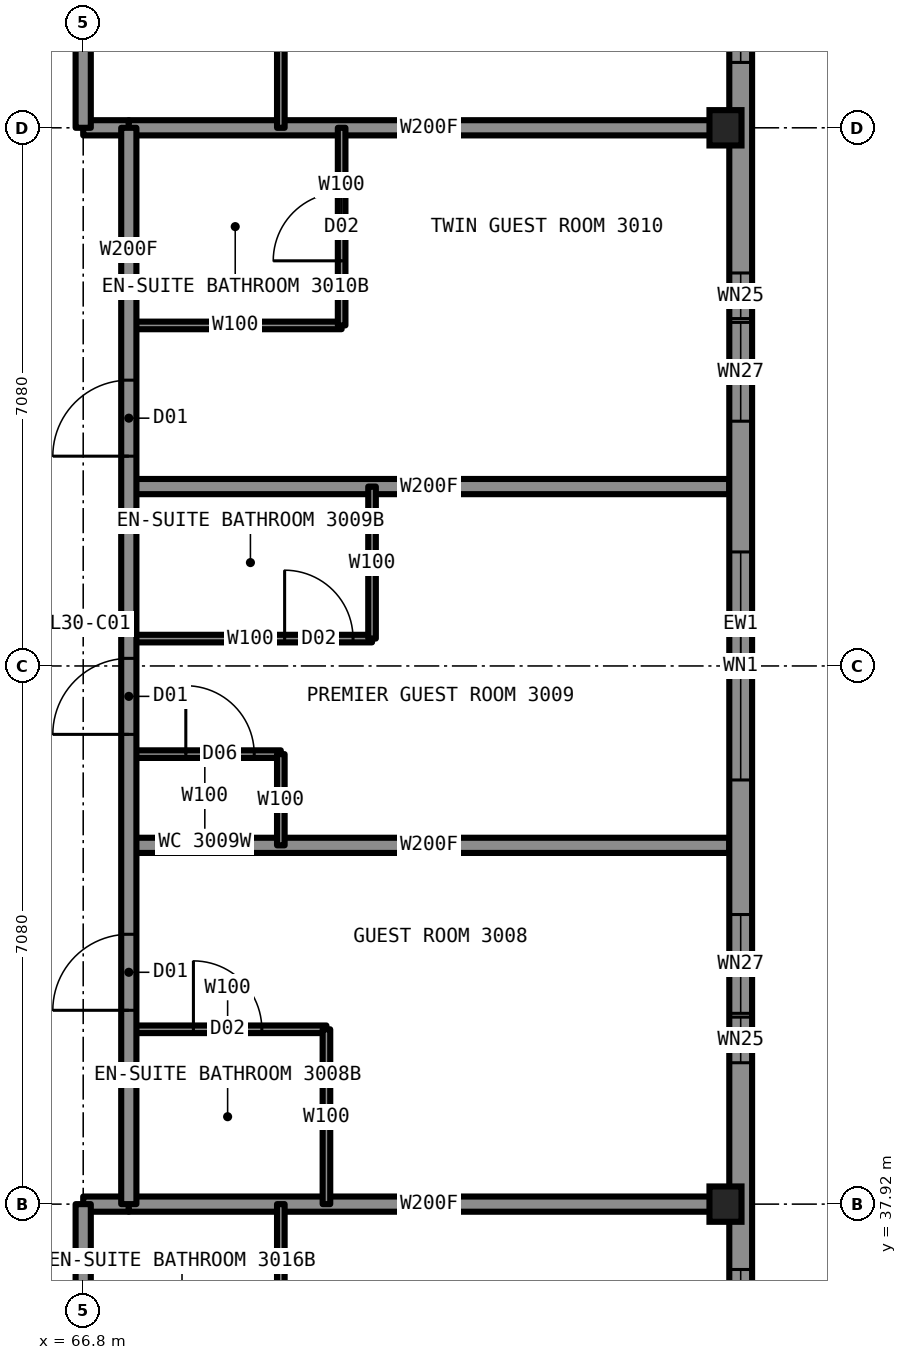
"""IFC4 building model, lengths in metres.
Left out: names, types, materials, properties, quantities, classifications, styles, units other than length and angle.
Written with IfcOpenShell. Run it as: python <this file> out.ifc"""

import sys

from ifc_helpers import new_model, si_unit, direction, frame, frame_2d, origin, origin_2d, place, context, subcontext, project, spatial, rectangle, i_section, extrude, element, fill, save


model = new_model("IFC4")
c1 = context("Model", 3, precision=1e-05, world=origin(), true_north=direction((0.0, 1.0)))
c2 = subcontext(c1, "Body", "Model", "MODEL_VIEW")
j1 = project(units=[si_unit("LENGTHUNIT", "METRE"), si_unit("PLANEANGLEUNIT", "RADIAN")], contexts=[c1])
p1 = place(None, origin())
s1 = spatial("IfcSite", under=j1, at=p1, CompositionType="ELEMENT")
p2 = place(p1, origin())
s2 = spatial("IfcBuilding", under=s1, at=p2, CompositionType="ELEMENT")
p3 = place(p2, frame((0.0, 0.0, 114.4)))
s3 = spatial("IfcBuildingStorey", under=s2, at=p3, CompositionType="ELEMENT", Elevation=114.4)
for number, where, z_axis, x_axis in (
    (1, (75.25, 37.92, 0.0), (0.0, 0.0, 1.0), (1.0, 0.0, 0.0)),
    (2, (75.25, 52.08, 0.0), (0.0, 0.0, 1.0), (1.0, 0.0, 0.0)),
):
    element("IfcColumn", number, at=place(p3, frame(where, z_axis=z_axis, x_axis=x_axis)), inside=s3, PredefinedType="COLUMN", context=c2, shape_type="SweptSolid", body=[
        extrude(i_section(OverallWidth=0.422, OverallDepth=0.465, WebThickness=0.045, FlangeThickness=0.073, at=origin_2d()), origin(), (0.0, 0.0, 1.0), 3.5),
    ])
p4 = place(p3, frame((67.4, 43.84, 0.0), z_axis=(0.0, 0.0, 1.0), x_axis=(1.0, 0.0, 0.0)))
e3 = element("IfcWall", 3, at=p4, inside=s3, PredefinedType="PARTITIONING", context=c2, shape_type="SweptSolid", body=[
    extrude(rectangle(XDim=2.0, YDim=0.1, at=frame_2d((1.0, 0.0))), origin(), (0.0, 0.0, 1.0), 3.33),
])
p5 = place(p4, frame((0.75, 0.0, 0.0)))
e4 = element("IfcOpeningElement", 4, at=p5, cuts=e3, PredefinedType="OPENING", context=c2, shape_type="SweptSolid", body=[
    extrude(rectangle(XDim=0.9, YDim=2.1, at=frame_2d((0.45, 1.05))), frame((0.0, 0.06, 0.0), z_axis=(0.0, -1.0, 0.0), x_axis=(1.0, 0.0, 0.0)), (0.0, 0.0, 1.0), 0.12),
])
p6 = place(p3, frame((67.4, 42.64, 0.0), z_axis=(0.0, 0.0, 1.0), x_axis=(1.0, 0.0, 0.0)))
e5 = element("IfcWall", 5, at=p6, inside=s3, PredefinedType="PARTITIONING", context=c2, shape_type="SweptSolid", body=[
    extrude(rectangle(XDim=7.9, YDim=0.2, at=frame_2d((3.95, 0.0))), origin(), (0.0, 0.0, 1.0), 2.731),
])
p7 = place(p3, frame((67.4, 40.22, 0.0), z_axis=(0.0, 0.0, 1.0), x_axis=(1.0, 0.0, 0.0)))
e6 = element("IfcWall", 6, at=p7, inside=s3, PredefinedType="PARTITIONING", context=c2, shape_type="SweptSolid", body=[
    extrude(rectangle(XDim=2.6, YDim=0.1, at=frame_2d((1.3, 0.0))), origin(), (0.0, 0.0, 1.0), 2.731),
])
p8 = place(p7, frame((0.85, 0.0, 0.0)))
e7 = element("IfcOpeningElement", 7, at=p8, cuts=e6, PredefinedType="OPENING", context=c2, shape_type="SweptSolid", body=[
    extrude(rectangle(XDim=0.9, YDim=2.1, at=frame_2d((0.45, 1.05))), frame((0.0, 0.06, 0.0), z_axis=(0.0, -1.0, 0.0), x_axis=(1.0, 0.0, 0.0)), (0.0, 0.0, 1.0), 0.12),
])
p9 = place(p3, frame((66.8, 37.92, 0.0), z_axis=(0.0, 0.0, 1.0), x_axis=(1.0, 0.0, 0.0)))
e8 = element("IfcWall", 8, at=p9, inside=s3, PredefinedType="PARTITIONING", context=c2, shape_type="SweptSolid", body=[
    extrude(rectangle(XDim=0.6, YDim=0.2, at=frame_2d((0.3, 0.0))), origin(), (0.0, 0.0, 1.0), 2.573),
])
p10 = place(p3, frame((67.4, 37.92, 0.0), z_axis=(0.0, 0.0, 1.0), x_axis=(1.0, 0.0, 0.0)))
e9 = element("IfcWall", 9, at=p10, inside=s3, PredefinedType="PARTITIONING", context=c2, shape_type="SweptSolid", body=[
    extrude(rectangle(XDim=7.9, YDim=0.2, at=frame_2d((3.95, 0.0))), origin(), (0.0, 0.0, 1.0), 2.573),
])
p11 = place(p3, frame((67.4, 45.36, 0.0), z_axis=(0.0, 0.0, 1.0), x_axis=(1.0, 0.0, 0.0)))
e10 = element("IfcWall", 10, at=p11, inside=s3, PredefinedType="PARTITIONING", context=c2, shape_type="SweptSolid", body=[
    extrude(rectangle(XDim=3.2, YDim=0.1, at=frame_2d((1.6, 0.0))), origin(), (0.0, 0.0, 1.0), 3.33),
])
p12 = place(p11, frame((2.05, 0.0, 0.0)))
e11 = element("IfcOpeningElement", 11, at=p12, cuts=e10, PredefinedType="OPENING", context=c2, shape_type="SweptSolid", body=[
    extrude(rectangle(XDim=0.9, YDim=2.1, at=frame_2d((0.45, 1.05))), frame((0.0, 0.06, 0.0), z_axis=(0.0, -1.0, 0.0), x_axis=(1.0, 0.0, 0.0)), (0.0, 0.0, 1.0), 0.12),
])
p13 = place(p3, frame((67.4, 47.36, 0.0), z_axis=(0.0, 0.0, 1.0), x_axis=(1.0, 0.0, 0.0)))
e12 = element("IfcWall", 12, at=p13, inside=s3, PredefinedType="PARTITIONING", context=c2, shape_type="SweptSolid", body=[
    extrude(rectangle(XDim=7.9, YDim=0.2, at=frame_2d((3.95, 0.0))), origin(), (0.0, 0.0, 1.0), 2.731),
])
p14 = place(p3, frame((67.4, 49.48, 0.0), z_axis=(0.0, 0.0, 1.0), x_axis=(1.0, 0.0, 0.0)))
e13 = element("IfcWall", 13, at=p14, inside=s3, PredefinedType="PARTITIONING", context=c2, shape_type="SweptSolid", body=[
    extrude(rectangle(XDim=2.8, YDim=0.1, at=frame_2d((1.4, 0.0))), origin(), (0.0, 0.0, 1.0), 3.33),
])
p15 = place(p3, frame((66.8, 52.08, 0.0), z_axis=(0.0, 0.0, 1.0), x_axis=(1.0, 0.0, 0.0)))
e14 = element("IfcWall", 14, at=p15, inside=s3, PredefinedType="PARTITIONING", context=c2, shape_type="SweptSolid", body=[
    extrude(rectangle(XDim=0.6, YDim=0.2, at=frame_2d((0.3, 0.0))), origin(), (0.0, 0.0, 1.0), 2.573),
])
p16 = place(p3, frame((67.4, 52.08, 0.0), z_axis=(0.0, 0.0, 1.0), x_axis=(1.0, 0.0, 0.0)))
e15 = element("IfcWall", 15, at=p16, inside=s3, PredefinedType="PARTITIONING", context=c2, shape_type="SweptSolid", body=[
    extrude(rectangle(XDim=7.9, YDim=0.2, at=frame_2d((3.95, 0.0))), origin(), (0.0, 0.0, 1.0), 2.573),
])
p17 = place(p3, frame((66.8, 33.2, 0.0), z_axis=(0.0, 0.0, 1.0), x_axis=(0.0, 1.0, 0.0)))
e16 = element("IfcWall", 16, at=p17, inside=s3, PredefinedType="PARTITIONING", context=c2, shape_type="SweptSolid", body=[
    extrude(rectangle(XDim=4.72, YDim=0.2, at=frame_2d((2.36, 0.0))), origin(), (0.0, 0.0, 1.0), 3.33),
])
p18 = place(p17, frame((0.66, 0.0, 0.0)))
e17 = element("IfcOpeningElement", 17, at=p18, cuts=e16, PredefinedType="OPENING", context=c2, shape_type="SweptSolid", body=[
    extrude(rectangle(XDim=1.1, YDim=2.2, at=frame_2d((0.55, 1.1))), frame((0.0, 0.11, 0.0), z_axis=(0.0, -1.0, 0.0), x_axis=(1.0, 0.0, 0.0)), (0.0, 0.0, 1.0), 0.22),
])
p19 = place(p3, frame((66.8, 52.08, 0.0), z_axis=(0.0, 0.0, 1.0), x_axis=(0.0, 1.0, 0.0)))
e18 = element("IfcWall", 18, at=p19, inside=s3, PredefinedType="PARTITIONING", context=c2, shape_type="SweptSolid", body=[
    extrude(rectangle(XDim=4.72, YDim=0.2, at=frame_2d((2.36, 0.0))), origin(), (0.0, 0.0, 1.0), 3.33),
])
p20 = place(p19, frame((2.96, 0.0, 0.0)))
e19 = element("IfcOpeningElement", 19, at=p20, cuts=e18, PredefinedType="OPENING", context=c2, shape_type="SweptSolid", body=[
    extrude(rectangle(XDim=1.1, YDim=2.2, at=frame_2d((0.55, 1.1))), frame((0.0, 0.11, 0.0), z_axis=(0.0, -1.0, 0.0), x_axis=(1.0, 0.0, 0.0)), (0.0, 0.0, 1.0), 0.22),
])
p21 = place(p3, frame((67.4, 37.92, 0.0), z_axis=(0.0, 0.0, 1.0), x_axis=(0.0, 1.0, 0.0)))
e20 = element("IfcWall", 20, at=p21, inside=s3, PredefinedType="PARTITIONING", context=c2, shape_type="SweptSolid", body=[
    extrude(rectangle(XDim=14.16, YDim=0.2, at=frame_2d((7.08, 0.0))), origin(), (0.0, 0.0, 1.0), 3.33),
])
p22 = place(p21, frame((2.55, 0.0, 0.0)))
e21 = element("IfcOpeningElement", 21, at=p22, cuts=e20, PredefinedType="OPENING", context=c2, shape_type="SweptSolid", body=[
    extrude(rectangle(XDim=1.0, YDim=2.2, at=frame_2d((0.5, 1.1))), frame((0.0, 0.11, 0.0), z_axis=(0.0, -1.0, 0.0), x_axis=(1.0, 0.0, 0.0)), (0.0, 0.0, 1.0), 0.22),
])
p23 = place(p21, frame((6.18, 0.0, 0.0)))
e22 = element("IfcOpeningElement", 22, at=p23, cuts=e20, PredefinedType="OPENING", context=c2, shape_type="SweptSolid", body=[
    extrude(rectangle(XDim=1.0, YDim=2.2, at=frame_2d((0.5, 1.1))), frame((0.0, 0.11, 0.0), z_axis=(0.0, -1.0, 0.0), x_axis=(1.0, 0.0, 0.0)), (0.0, 0.0, 1.0), 0.22),
])
p24 = place(p21, frame((9.84, 0.0, 0.0)))
e23 = element("IfcOpeningElement", 23, at=p24, cuts=e20, PredefinedType="OPENING", context=c2, shape_type="SweptSolid", body=[
    extrude(rectangle(XDim=1.0, YDim=2.2, at=frame_2d((0.5, 1.1))), frame((0.0, 0.11, 0.0), z_axis=(0.0, -1.0, 0.0), x_axis=(1.0, 0.0, 0.0)), (0.0, 0.0, 1.0), 0.22),
])
p25 = place(p3, frame((69.4, 35.32, 0.0), z_axis=(0.0, 0.0, 1.0), x_axis=(0.0, 1.0, 0.0)))
e24 = element("IfcWall", 24, at=p25, inside=s3, PredefinedType="PARTITIONING", context=c2, shape_type="SweptSolid", body=[
    extrude(rectangle(XDim=2.6, YDim=0.1, at=frame_2d((1.3, 0.0))), origin(), (0.0, 0.0, 1.0), 3.33),
])
p26 = place(p3, frame((69.4, 42.64, 0.0), z_axis=(0.0, 0.0, 1.0), x_axis=(0.0, 1.0, 0.0)))
e25 = element("IfcWall", 25, at=p26, inside=s3, PredefinedType="PARTITIONING", context=c2, shape_type="SweptSolid", body=[
    extrude(rectangle(XDim=1.2, YDim=0.1, at=frame_2d((0.6, 0.0))), origin(), (0.0, 0.0, 1.0), 3.33),
])
p27 = place(p3, frame((69.4, 52.08, 0.0), z_axis=(0.0, 0.0, 1.0), x_axis=(0.0, 1.0, 0.0)))
e26 = element("IfcWall", 26, at=p27, inside=s3, PredefinedType="PARTITIONING", context=c2, shape_type="SweptSolid", body=[
    extrude(rectangle(XDim=2.6, YDim=0.1, at=frame_2d((1.3, 0.0))), origin(), (0.0, 0.0, 1.0), 3.33),
])
p28 = place(p3, frame((70.0, 37.92, 0.0), z_axis=(0.0, 0.0, 1.0), x_axis=(0.0, 1.0, 0.0)))
e27 = element("IfcWall", 27, at=p28, inside=s3, PredefinedType="PARTITIONING", context=c2, shape_type="SweptSolid", body=[
    extrude(rectangle(XDim=2.3, YDim=0.1, at=frame_2d((1.15, 0.0))), origin(), (0.0, 0.0, 1.0), 3.33),
])
p29 = place(p3, frame((70.2, 49.48, 0.0), z_axis=(0.0, 0.0, 1.0), x_axis=(0.0, 1.0, 0.0)))
e28 = element("IfcWall", 28, at=p29, inside=s3, PredefinedType="PARTITIONING", context=c2, shape_type="SweptSolid", body=[
    extrude(rectangle(XDim=2.6, YDim=0.1, at=frame_2d((1.3, 0.0))), origin(), (0.0, 0.0, 1.0), 3.33),
])
p30 = place(p29, frame((0.85, 0.0, 0.0)))
e29 = element("IfcOpeningElement", 29, at=p30, cuts=e28, PredefinedType="OPENING", context=c2, shape_type="SweptSolid", body=[
    extrude(rectangle(XDim=0.9, YDim=2.1, at=frame_2d((0.45, 1.05))), frame((0.0, 0.06, 0.0), z_axis=(0.0, -1.0, 0.0), x_axis=(1.0, 0.0, 0.0)), (0.0, 0.0, 1.0), 0.12),
])
p31 = place(p3, frame((70.6, 45.36, 0.0), z_axis=(0.0, 0.0, 1.0), x_axis=(0.0, 1.0, 0.0)))
e30 = element("IfcWall", 30, at=p31, inside=s3, PredefinedType="PARTITIONING", context=c2, shape_type="SweptSolid", body=[
    extrude(rectangle(XDim=2.0, YDim=0.1, at=frame_2d((1.0, 0.0))), origin(), (0.0, 0.0, 1.0), 3.33),
])
p32 = place(p3, frame((75.45, 29.9, 0.0), z_axis=(0.0, 0.0, 1.0), x_axis=(0.0, 1.0, 0.0)))
e31 = element("IfcWall", 31, at=p32, inside=s3, PredefinedType="SOLIDWALL", context=c2, shape_type="SweptSolid", body=[
    extrude(rectangle(XDim=30.2, YDim=0.3, at=frame_2d((15.1, 0.0))), origin(), (0.0, 0.0, 1.0), 2.83),
])
p33 = place(p32, frame((0.85, 0.0, 0.5)))
e32 = element("IfcOpeningElement", 32, at=p33, cuts=e31, PredefinedType="OPENING", context=c2, shape_type="SweptSolid", body=[
    extrude(rectangle(XDim=1.6, YDim=2.0, at=frame_2d((0.8, 1.0))), frame((0.0, 0.16, 0.0), z_axis=(0.0, -1.0, 0.0), x_axis=(1.0, 0.0, 0.0)), (0.0, 0.0, 1.0), 0.32),
])
p34 = place(p32, frame((4.16, 0.0, 0.5)))
e33 = element("IfcOpeningElement", 33, at=p34, cuts=e31, PredefinedType="OPENING", context=c2, shape_type="SweptSolid", body=[
    extrude(rectangle(XDim=3.0, YDim=2.0, at=frame_2d((1.5, 1.0))), frame((0.0, 0.16, 0.0), z_axis=(0.0, -1.0, 0.0), x_axis=(1.0, 0.0, 0.0)), (0.0, 0.0, 1.0), 0.32),
])
p35 = place(p32, frame((10.53, 0.0, 0.5)))
e34 = element("IfcOpeningElement", 34, at=p35, cuts=e31, PredefinedType="OPENING", context=c2, shape_type="SweptSolid", body=[
    extrude(rectangle(XDim=1.3, YDim=1.9, at=frame_2d((0.65, 0.95))), frame((0.0, 0.16, 0.0), z_axis=(0.0, -1.0, 0.0), x_axis=(1.0, 0.0, 0.0)), (0.0, 0.0, 1.0), 0.32),
])
p36 = place(p32, frame((13.6, 0.0, 0.5)))
e35 = element("IfcOpeningElement", 35, at=p36, cuts=e31, PredefinedType="OPENING", context=c2, shape_type="SweptSolid", body=[
    extrude(rectangle(XDim=3.0, YDim=2.0, at=frame_2d((1.5, 1.0))), frame((0.0, 0.16, 0.0), z_axis=(0.0, -1.0, 0.0), x_axis=(1.0, 0.0, 0.0)), (0.0, 0.0, 1.0), 0.32),
])
p37 = place(p32, frame((18.32, 0.0, 0.5)))
e36 = element("IfcOpeningElement", 36, at=p37, cuts=e31, PredefinedType="OPENING", context=c2, shape_type="SweptSolid", body=[
    extrude(rectangle(XDim=1.3, YDim=1.9, at=frame_2d((0.65, 0.95))), frame((0.0, 0.16, 0.0), z_axis=(0.0, -1.0, 0.0), x_axis=(1.0, 0.0, 0.0)), (0.0, 0.0, 1.0), 0.32),
])
p38 = place(p32, frame((23.04, 0.0, 0.5)))
e37 = element("IfcOpeningElement", 37, at=p38, cuts=e31, PredefinedType="OPENING", context=c2, shape_type="SweptSolid", body=[
    extrude(rectangle(XDim=3.0, YDim=2.0, at=frame_2d((1.5, 1.0))), frame((0.0, 0.16, 0.0), z_axis=(0.0, -1.0, 0.0), x_axis=(1.0, 0.0, 0.0)), (0.0, 0.0, 1.0), 0.32),
])
p39 = place(p32, frame((27.75, 0.0, 0.5)))
e38 = element("IfcOpeningElement", 38, at=p39, cuts=e31, PredefinedType="OPENING", context=c2, shape_type="SweptSolid", body=[
    extrude(rectangle(XDim=1.6, YDim=2.0, at=frame_2d((0.8, 1.0))), frame((0.0, 0.16, 0.0), z_axis=(0.0, -1.0, 0.0), x_axis=(1.0, 0.0, 0.0)), (0.0, 0.0, 1.0), 0.32),
])
p40 = place(p32, frame((9.88, 0.0, 0.5)))
e39 = element("IfcOpeningElement", 39, at=p40, cuts=e31, PredefinedType="OPENING", context=c2, shape_type="SweptSolid", body=[
    extrude(rectangle(XDim=0.6, YDim=0.9, at=frame_2d((0.3, 0.45))), frame((0.0, 0.16, 0.0), z_axis=(0.0, -1.0, 0.0), x_axis=(1.0, 0.0, 0.0)), (0.0, 0.0, 1.0), 0.32),
])
p41 = place(p32, frame((19.67, 0.0, 0.5)))
e40 = element("IfcOpeningElement", 40, at=p41, cuts=e31, PredefinedType="OPENING", context=c2, shape_type="SweptSolid", body=[
    extrude(rectangle(XDim=0.6, YDim=0.9, at=frame_2d((0.3, 0.45))), frame((0.0, 0.16, 0.0), z_axis=(0.0, -1.0, 0.0), x_axis=(1.0, 0.0, 0.0)), (0.0, 0.0, 1.0), 0.32),
])
p42 = place(p22, origin())
e41 = element("IfcDoor", 41, at=p42, inside=s3, OperationType="SINGLE_SWING_LEFT", PredefinedType="DOOR", context=c2, shape_type="SweptSolid", body=[
    extrude(rectangle(XDim=1.0, YDim=2.2, at=frame_2d((0.5, 1.1))), frame((0.0, 0.025, 0.0), z_axis=(0.0, -1.0, 0.0), x_axis=(1.0, 0.0, 0.0)), (0.0, 0.0, 1.0), 0.05),
])
fill(e21, e41)
p43 = place(p8, origin())
e42 = element("IfcDoor", 42, at=p43, inside=s3, OperationType="SINGLE_SWING_RIGHT", PredefinedType="DOOR", context=c2, shape_type="SweptSolid", body=[
    extrude(rectangle(XDim=0.9, YDim=2.1, at=frame_2d((0.45, 1.05))), frame((0.0, 0.025, 0.0), z_axis=(0.0, -1.0, 0.0), x_axis=(1.0, 0.0, 0.0)), (0.0, 0.0, 1.0), 0.05),
])
fill(e7, e42)
p44 = place(p23, origin())
e43 = element("IfcDoor", 43, at=p44, inside=s3, OperationType="SINGLE_SWING_LEFT", PredefinedType="DOOR", context=c2, shape_type="SweptSolid", body=[
    extrude(rectangle(XDim=1.0, YDim=2.2, at=frame_2d((0.5, 1.1))), frame((0.0, 0.025, 0.0), z_axis=(0.0, -1.0, 0.0), x_axis=(1.0, 0.0, 0.0)), (0.0, 0.0, 1.0), 0.05),
])
fill(e22, e43)
p45 = place(p12, origin())
e44 = element("IfcDoor", 44, at=p45, inside=s3, OperationType="SINGLE_SWING_RIGHT", PredefinedType="DOOR", context=c2, shape_type="SweptSolid", body=[
    extrude(rectangle(XDim=0.9, YDim=2.1, at=frame_2d((0.45, 1.05))), frame((0.0, 0.025, 0.0), z_axis=(0.0, -1.0, 0.0), x_axis=(1.0, 0.0, 0.0)), (0.0, 0.0, 1.0), 0.05),
])
fill(e11, e44)
p46 = place(p5, origin())
e45 = element("IfcDoor", 45, at=p46, inside=s3, OperationType="SINGLE_SWING_LEFT", PredefinedType="DOOR", context=c2, shape_type="SweptSolid", body=[
    extrude(rectangle(XDim=0.9, YDim=2.1, at=frame_2d((0.45, 1.05))), frame((0.0, 0.025, 0.0), z_axis=(0.0, -1.0, 0.0), x_axis=(1.0, 0.0, 0.0)), (0.0, 0.0, 1.0), 0.05),
])
fill(e4, e45)
p47 = place(p24, origin())
e46 = element("IfcDoor", 46, at=p47, inside=s3, OperationType="SINGLE_SWING_LEFT", PredefinedType="DOOR", context=c2, shape_type="SweptSolid", body=[
    extrude(rectangle(XDim=1.0, YDim=2.2, at=frame_2d((0.5, 1.1))), frame((0.0, 0.025, 0.0), z_axis=(0.0, -1.0, 0.0), x_axis=(1.0, 0.0, 0.0)), (0.0, 0.0, 1.0), 0.05),
])
fill(e23, e46)
p48 = place(p30, origin())
e47 = element("IfcDoor", 47, at=p48, inside=s3, OperationType="SINGLE_SWING_RIGHT", PredefinedType="DOOR", context=c2, shape_type="SweptSolid", body=[
    extrude(rectangle(XDim=0.9, YDim=2.1, at=frame_2d((0.45, 1.05))), frame((0.0, 0.025, 0.0), z_axis=(0.0, -1.0, 0.0), x_axis=(1.0, 0.0, 0.0)), (0.0, 0.0, 1.0), 0.05),
])
fill(e29, e47)
p49 = place(p34, origin())
e48 = element("IfcWindow", 48, at=p49, inside=s3, PartitioningType="SINGLE_PANEL", PredefinedType="WINDOW", context=c2, shape_type="SweptSolid", body=[
    extrude(rectangle(XDim=3.0, YDim=2.0, at=frame_2d((1.5, 1.0))), frame((0.0, 0.03, 0.0), z_axis=(0.0, -1.0, 0.0), x_axis=(1.0, 0.0, 0.0)), (0.0, 0.0, 1.0), 0.06),
])
fill(e33, e48)
p50 = place(p35, origin())
e49 = element("IfcWindow", 49, at=p50, inside=s3, PartitioningType="SINGLE_PANEL", PredefinedType="WINDOW", context=c2, shape_type="SweptSolid", body=[
    extrude(rectangle(XDim=1.3, YDim=1.9, at=frame_2d((0.65, 0.95))), frame((0.0, 0.03, 0.0), z_axis=(0.0, -1.0, 0.0), x_axis=(1.0, 0.0, 0.0)), (0.0, 0.0, 1.0), 0.06),
])
fill(e34, e49)
p51 = place(p36, origin())
e50 = element("IfcWindow", 50, at=p51, inside=s3, PartitioningType="SINGLE_PANEL", PredefinedType="WINDOW", context=c2, shape_type="SweptSolid", body=[
    extrude(rectangle(XDim=3.0, YDim=2.0, at=frame_2d((1.5, 1.0))), frame((0.0, 0.03, 0.0), z_axis=(0.0, -1.0, 0.0), x_axis=(1.0, 0.0, 0.0)), (0.0, 0.0, 1.0), 0.06),
])
fill(e35, e50)
p52 = place(p37, origin())
e51 = element("IfcWindow", 51, at=p52, inside=s3, PartitioningType="SINGLE_PANEL", PredefinedType="WINDOW", context=c2, shape_type="SweptSolid", body=[
    extrude(rectangle(XDim=1.3, YDim=1.9, at=frame_2d((0.65, 0.95))), frame((0.0, 0.03, 0.0), z_axis=(0.0, -1.0, 0.0), x_axis=(1.0, 0.0, 0.0)), (0.0, 0.0, 1.0), 0.06),
])
fill(e36, e51)
p53 = place(p38, origin())
e52 = element("IfcWindow", 52, at=p53, inside=s3, PartitioningType="SINGLE_PANEL", PredefinedType="WINDOW", context=c2, shape_type="SweptSolid", body=[
    extrude(rectangle(XDim=3.0, YDim=2.0, at=frame_2d((1.5, 1.0))), frame((0.0, 0.03, 0.0), z_axis=(0.0, -1.0, 0.0), x_axis=(1.0, 0.0, 0.0)), (0.0, 0.0, 1.0), 0.06),
])
fill(e37, e52)
p54 = place(p40, origin())
e53 = element("IfcWindow", 53, at=p54, inside=s3, PartitioningType="SINGLE_PANEL", PredefinedType="WINDOW", context=c2, shape_type="SweptSolid", body=[
    extrude(rectangle(XDim=0.6, YDim=0.9, at=frame_2d((0.3, 0.45))), frame((0.0, 0.03, 0.0), z_axis=(0.0, -1.0, 0.0), x_axis=(1.0, 0.0, 0.0)), (0.0, 0.0, 1.0), 0.06),
])
fill(e39, e53)
p55 = place(p41, origin())
e54 = element("IfcWindow", 54, at=p55, inside=s3, PartitioningType="SINGLE_PANEL", PredefinedType="WINDOW", context=c2, shape_type="SweptSolid", body=[
    extrude(rectangle(XDim=0.6, YDim=0.9, at=frame_2d((0.3, 0.45))), frame((0.0, 0.03, 0.0), z_axis=(0.0, -1.0, 0.0), x_axis=(1.0, 0.0, 0.0)), (0.0, 0.0, 1.0), 0.06),
])
fill(e40, e54)
save(model, sys.argv[1])
